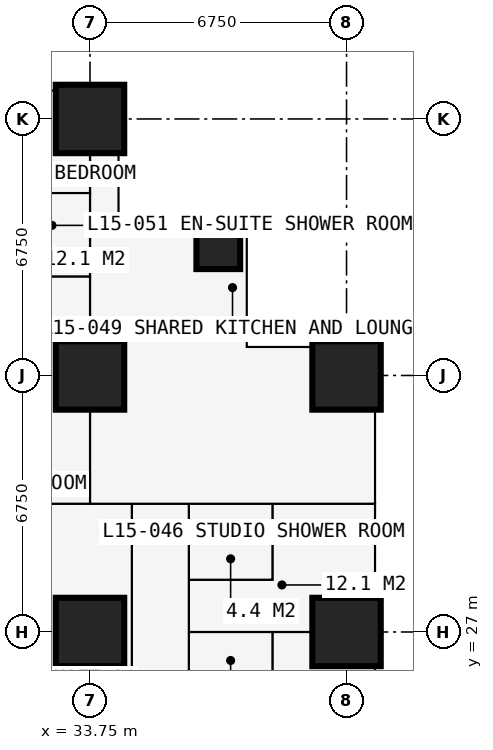
"""IFC4 building model, lengths in metres.
Left out: names, types, materials, properties, quantities, classifications, styles, units other than length and angle.
Written with IfcOpenShell. Run it as: python <this file> out.ifc"""

import sys

from ifc_helpers import new_model, si_unit, direction, frame, frame_2d, origin, origin_2d, place, context, subcontext, project, spatial, rectangle, extrude, element, fill, save


model = new_model("IFC4")
c1 = context("Model", 3, precision=1e-05, world=origin(), true_north=direction((0.0, 1.0)))
c2 = subcontext(c1, "Body", "Model", "MODEL_VIEW")
j1 = project(units=[si_unit("LENGTHUNIT", "METRE"), si_unit("PLANEANGLEUNIT", "RADIAN")], contexts=[c1])
p1 = place(None, origin())
s1 = spatial("IfcSite", under=j1, at=p1, CompositionType="ELEMENT")
p2 = place(p1, origin())
s2 = spatial("IfcBuilding", under=s1, at=p2, CompositionType="ELEMENT")
p3 = place(p2, frame((0.0, 0.0, 57.6)))
s3 = spatial("IfcBuildingStorey", under=s2, at=p3, CompositionType="ELEMENT", Elevation=57.6)
for number, where, z_axis, x_axis in (
    (1, (33.75, 27.0, 0.0), (0.0, 0.0, 1.0), (1.0, 0.0, 0.0)),
    (2, (33.75, 33.75, 0.0), (0.0, 0.0, 1.0), (1.0, 0.0, 0.0)),
    (3, (33.75, 40.5, 0.0), (0.0, 0.0, 1.0), (1.0, 0.0, 0.0)),
):
    element("IfcColumn", number, at=place(p3, frame(where, z_axis=z_axis, x_axis=x_axis)), inside=s3, PredefinedType="COLUMN", context=c2, shape_type="SweptSolid", body=[
        extrude(rectangle(XDim=1.8, YDim=1.8, at=origin_2d()), origin(), (0.0, 0.0, 1.0), 3.6),
    ])
p4 = place(p3, frame((37.125, 37.125, 0.0), z_axis=(0.0, 0.0, 1.0), x_axis=(1.0, 0.0, 0.0)))
e4 = element("IfcColumn", 4, at=p4, inside=s3, PredefinedType="COLUMN", context=c2, shape_type="SweptSolid", body=[
    extrude(rectangle(XDim=1.15, YDim=1.15, at=origin_2d()), origin(), (0.0, 0.0, 1.0), 3.6),
])
for number, where, z_axis, x_axis in (
    (5, (40.5, 27.0, 0.0), (0.0, 0.0, 1.0), (1.0, 0.0, 0.0)),
    (6, (40.5, 33.75, 0.0), (0.0, 0.0, 1.0), (1.0, 0.0, 0.0)),
):
    element("IfcColumn", number, at=place(p3, frame(where, z_axis=z_axis, x_axis=x_axis)), inside=s3, PredefinedType="COLUMN", context=c2, shape_type="SweptSolid", body=[
        extrude(rectangle(XDim=1.8, YDim=1.8, at=origin_2d()), origin(), (0.0, 0.0, 1.0), 3.6),
    ])
p5 = place(p3, frame((41.25, 27.0, 0.0), z_axis=(0.0, 0.0, 1.0), x_axis=(0.0, -1.0, 0.0)))
e7 = element("IfcWall", 7, at=p5, inside=s3, PredefinedType="SOLIDWALL", context=c2, shape_type="SweptSolid", body=[
    extrude(rectangle(XDim=6.75, YDim=0.15, at=frame_2d((3.375, 0.0))), origin(), (0.0, 0.0, 1.0), 3.375),
])
p6 = place(p5, frame((0.962, 0.0, 0.0)))
e8 = element("IfcOpeningElement", 8, at=p6, cuts=e7, PredefinedType="OPENING", context=c2, shape_type="SweptSolid", body=[
    extrude(rectangle(XDim=1.0, YDim=2.2, at=frame_2d((0.5, 1.1))), frame((0.0, 0.085, 0.0), z_axis=(0.0, -1.0, 0.0), x_axis=(1.0, 0.0, 0.0)), (0.0, 0.0, 1.0), 0.17),
])
p7 = place(p5, frame((2.025, 0.0, 0.9)))
e9 = element("IfcOpeningElement", 9, at=p7, cuts=e7, PredefinedType="OPENING", context=c2, shape_type="SweptSolid", body=[
    extrude(rectangle(XDim=1.2, YDim=1.8, at=frame_2d((0.6, 0.9))), frame((0.0, 0.085, 0.0), z_axis=(0.0, -1.0, 0.0), x_axis=(1.0, 0.0, 0.0)), (0.0, 0.0, 1.0), 0.17),
])
p8 = place(p5, frame((4.788, 0.0, 0.0)))
e10 = element("IfcOpeningElement", 10, at=p8, cuts=e7, PredefinedType="OPENING", context=c2, shape_type="SweptSolid", body=[
    extrude(rectangle(XDim=1.0, YDim=2.2, at=frame_2d((0.5, 1.1))), frame((0.0, 0.085, 0.0), z_axis=(0.0, -1.0, 0.0), x_axis=(1.0, 0.0, 0.0)), (0.0, 0.0, 1.0), 0.17),
])
p9 = place(p5, frame((3.525, 0.0, 0.9)))
e11 = element("IfcOpeningElement", 11, at=p9, cuts=e7, PredefinedType="OPENING", context=c2, shape_type="SweptSolid", body=[
    extrude(rectangle(XDim=1.2, YDim=1.8, at=frame_2d((0.6, 0.9))), frame((0.0, 0.085, 0.0), z_axis=(0.0, -1.0, 0.0), x_axis=(1.0, 0.0, 0.0)), (0.0, 0.0, 1.0), 0.17),
])
p10 = place(p3, frame((41.25, 34.5, 0.0), z_axis=(0.0, 0.0, 1.0), x_axis=(-1.0, 0.0, 0.0)))
e12 = element("IfcWall", 12, at=p10, inside=s3, PredefinedType="SOLIDWALL", context=c2, shape_type="SweptSolid", body=[
    extrude(rectangle(XDim=3.375, YDim=0.3, at=frame_2d((1.688, 0.0))), origin(), (0.0, 0.0, 1.0), 3.375),
])
p11 = place(p10, frame((1.833, 0.0, 0.9)))
e13 = element("IfcOpeningElement", 13, at=p11, cuts=e12, PredefinedType="OPENING", context=c2, shape_type="SweptSolid", body=[
    extrude(rectangle(XDim=1.2, YDim=1.8, at=frame_2d((0.6, 0.9))), frame((0.0, 0.16, 0.0), z_axis=(0.0, -1.0, 0.0), x_axis=(1.0, 0.0, 0.0)), (0.0, 0.0, 1.0), 0.32),
])
p12 = place(p3, frame((37.875, 34.5, 0.0), z_axis=(0.0, 0.0, 1.0), x_axis=(0.0, 1.0, 0.0)))
e14 = element("IfcWall", 14, at=p12, inside=s3, PredefinedType="SOLIDWALL", context=c2, shape_type="SweptSolid", body=[
    extrude(rectangle(XDim=3.375, YDim=0.3, at=frame_2d((1.688, 0.0))), origin(), (0.0, 0.0, 1.0), 3.375),
])
p13 = place(p12, frame((0.788, 0.0, 0.6)))
e15 = element("IfcOpeningElement", 15, at=p13, cuts=e14, PredefinedType="OPENING", context=c2, shape_type="SweptSolid", body=[
    extrude(rectangle(XDim=1.8, YDim=2.1, at=frame_2d((0.9, 1.05))), frame((0.0, 0.16, 0.0), z_axis=(0.0, -1.0, 0.0), x_axis=(1.0, 0.0, 0.0)), (0.0, 0.0, 1.0), 0.32),
])
p14 = place(p3, frame((37.875, 37.875, 0.0), z_axis=(0.0, 0.0, 1.0), x_axis=(-1.0, 0.0, 0.0)))
e16 = element("IfcWall", 16, at=p14, inside=s3, PredefinedType="SOLIDWALL", context=c2, shape_type="SweptSolid", body=[
    extrude(rectangle(XDim=3.375, YDim=0.3, at=frame_2d((1.688, 0.0))), origin(), (0.0, 0.0, 1.0), 3.375),
])
p15 = place(p14, frame((0.788, 0.0, 0.6)))
e17 = element("IfcOpeningElement", 17, at=p15, cuts=e16, PredefinedType="OPENING", context=c2, shape_type="SweptSolid", body=[
    extrude(rectangle(XDim=1.8, YDim=2.1, at=frame_2d((0.9, 1.05))), frame((0.0, 0.16, 0.0), z_axis=(0.0, -1.0, 0.0), x_axis=(1.0, 0.0, 0.0)), (0.0, 0.0, 1.0), 0.32),
])
p16 = place(p3, frame((34.5, 37.875, 0.0), z_axis=(0.0, 0.0, 1.0), x_axis=(0.0, 1.0, 0.0)))
e18 = element("IfcWall", 18, at=p16, inside=s3, PredefinedType="SOLIDWALL", context=c2, shape_type="SweptSolid", body=[
    extrude(rectangle(XDim=3.375, YDim=0.3, at=frame_2d((1.688, 0.0))), origin(), (0.0, 0.0, 1.0), 3.375),
])
p17 = place(p16, frame((0.343, 0.0, 0.9)))
e19 = element("IfcOpeningElement", 19, at=p17, cuts=e18, PredefinedType="OPENING", context=c2, shape_type="SweptSolid", body=[
    extrude(rectangle(XDim=1.2, YDim=1.8, at=frame_2d((0.6, 0.9))), frame((0.0, 0.16, 0.0), z_axis=(0.0, -1.0, 0.0), x_axis=(1.0, 0.0, 0.0)), (0.0, 0.0, 1.0), 0.32),
])
p18 = place(p3, frame((10.125, 36.35, 0.0), z_axis=(0.0, 0.0, 1.0), x_axis=(1.0, 0.0, 0.0)))
e20 = element("IfcWall", 20, at=p18, inside=s3, PredefinedType="PARTITIONING", context=c2, shape_type="SweptSolid", body=[
    extrude(rectangle(XDim=23.625, YDim=0.1, at=frame_2d((11.812, 0.0))), origin(), (0.0, 0.0, 1.0), 3.375),
])
p19 = place(p18, frame((20.5, 0.0, 0.0)))
e21 = element("IfcOpeningElement", 21, at=p19, cuts=e20, PredefinedType="OPENING", context=c2, shape_type="SweptSolid", body=[
    extrude(rectangle(XDim=0.95, YDim=2.2, at=frame_2d((0.475, 1.1))), frame((0.0, 0.06, 0.0), z_axis=(0.0, -1.0, 0.0), x_axis=(1.0, 0.0, 0.0)), (0.0, 0.0, 1.0), 0.12),
])
p20 = place(p18, frame((17.125, 0.0, 0.0)))
e22 = element("IfcOpeningElement", 22, at=p20, cuts=e20, PredefinedType="OPENING", context=c2, shape_type="SweptSolid", body=[
    extrude(rectangle(XDim=0.95, YDim=2.2, at=frame_2d((0.475, 1.1))), frame((0.0, 0.06, 0.0), z_axis=(0.0, -1.0, 0.0), x_axis=(1.0, 0.0, 0.0)), (0.0, 0.0, 1.0), 0.12),
])
p21 = place(p18, frame((13.7, 0.0, 0.0)))
e23 = element("IfcOpeningElement", 23, at=p21, cuts=e20, PredefinedType="OPENING", context=c2, shape_type="SweptSolid", body=[
    extrude(rectangle(XDim=0.95, YDim=2.2, at=frame_2d((0.475, 1.1))), frame((0.0, 0.06, 0.0), z_axis=(0.0, -1.0, 0.0), x_axis=(1.0, 0.0, 0.0)), (0.0, 0.0, 1.0), 0.12),
])
p22 = place(p18, frame((0.2, 0.0, 0.0)))
e24 = element("IfcOpeningElement", 24, at=p22, cuts=e20, PredefinedType="OPENING", context=c2, shape_type="SweptSolid", body=[
    extrude(rectangle(XDim=0.95, YDim=2.2, at=frame_2d((0.475, 1.1))), frame((0.0, 0.06, 0.0), z_axis=(0.0, -1.0, 0.0), x_axis=(1.0, 0.0, 0.0)), (0.0, 0.0, 1.0), 0.12),
])
p23 = place(p18, frame((3.625, 0.0, 0.0)))
e25 = element("IfcOpeningElement", 25, at=p23, cuts=e20, PredefinedType="OPENING", context=c2, shape_type="SweptSolid", body=[
    extrude(rectangle(XDim=0.95, YDim=2.2, at=frame_2d((0.475, 1.1))), frame((0.0, 0.06, 0.0), z_axis=(0.0, -1.0, 0.0), x_axis=(1.0, 0.0, 0.0)), (0.0, 0.0, 1.0), 0.12),
])
p24 = place(p18, frame((7.0, 0.0, 0.0)))
e26 = element("IfcOpeningElement", 26, at=p24, cuts=e20, PredefinedType="OPENING", context=c2, shape_type="SweptSolid", body=[
    extrude(rectangle(XDim=0.95, YDim=2.2, at=frame_2d((0.475, 1.1))), frame((0.0, 0.06, 0.0), z_axis=(0.0, -1.0, 0.0), x_axis=(1.0, 0.0, 0.0)), (0.0, 0.0, 1.0), 0.12),
])
p25 = place(p18, frame((10.375, 0.0, 0.0)))
e27 = element("IfcOpeningElement", 27, at=p25, cuts=e20, PredefinedType="OPENING", context=c2, shape_type="SweptSolid", body=[
    extrude(rectangle(XDim=0.95, YDim=2.2, at=frame_2d((0.475, 1.1))), frame((0.0, 0.06, 0.0), z_axis=(0.0, -1.0, 0.0), x_axis=(1.0, 0.0, 0.0)), (0.0, 0.0, 1.0), 0.12),
])
p26 = place(p3, frame((30.375, 30.375, 0.0), z_axis=(0.0, 0.0, 1.0), x_axis=(1.0, 0.0, 0.0)))
e28 = element("IfcWall", 28, at=p26, inside=s3, PredefinedType="PARTITIONING", context=c2, shape_type="SweptSolid", body=[
    extrude(rectangle(XDim=10.859, YDim=0.15, at=frame_2d((5.429, 0.0))), origin(), (0.0, 0.0, 1.0), 3.375),
])
p27 = place(p3, frame((31.75, 38.55, 0.0), z_axis=(0.0, 0.0, 1.0), x_axis=(1.0, 0.0, 0.0)))
e29 = element("IfcWall", 29, at=p27, inside=s3, PredefinedType="PARTITIONING", context=c2, shape_type="SweptSolid", body=[
    extrude(rectangle(XDim=2.0, YDim=0.1, at=frame_2d((1.0, 0.0))), origin(), (0.0, 0.0, 1.0), 3.375),
])
p28 = place(p3, frame((33.75, 30.375, 0.0), z_axis=(0.0, 0.0, 1.0), x_axis=(0.0, 1.0, 0.0)))
e30 = element("IfcWall", 30, at=p28, inside=s3, PredefinedType="PARTITIONING", context=c2, shape_type="SweptSolid", body=[
    extrude(rectangle(XDim=10.859, YDim=0.15, at=frame_2d((5.429, 0.0))), origin(), (0.0, 0.0, 1.0), 2.877),
])
p29 = place(p28, frame((1.45, 0.0, 0.0)))
e31 = element("IfcOpeningElement", 31, at=p29, cuts=e30, PredefinedType="OPENING", context=c2, shape_type="SweptSolid", body=[
    extrude(rectangle(XDim=1.0, YDim=2.2, at=frame_2d((0.5, 1.1))), frame((0.0, 0.085, 0.0), z_axis=(0.0, -1.0, 0.0), x_axis=(1.0, 0.0, 0.0)), (0.0, 0.0, 1.0), 0.17),
])
p30 = place(p3, frame((34.85, 12.55, 0.0), z_axis=(0.0, 0.0, 1.0), x_axis=(0.0, 1.0, 0.0)))
e32 = element("IfcWall", 32, at=p30, inside=s3, PredefinedType="PARTITIONING", context=c2, shape_type="SweptSolid", body=[
    extrude(rectangle(XDim=17.825, YDim=0.15, at=frame_2d((8.913, 0.0))), origin(), (0.0, 0.0, 1.0), 3.375),
])
p31 = place(p30, frame((8.6, 0.0, 0.0)))
e33 = element("IfcOpeningElement", 33, at=p31, cuts=e32, PredefinedType="OPENING", context=c2, shape_type="SweptSolid", body=[
    extrude(rectangle(XDim=0.95, YDim=2.2, at=frame_2d((0.475, 1.1))), frame((0.0, 0.085, 0.0), z_axis=(0.0, -1.0, 0.0), x_axis=(1.0, 0.0, 0.0)), (0.0, 0.0, 1.0), 0.17),
])
p32 = place(p3, frame((36.35, 6.75, 0.0), z_axis=(0.0, 0.0, 1.0), x_axis=(0.0, 1.0, 0.0)))
e34 = element("IfcWall", 34, at=p32, inside=s3, PredefinedType="PARTITIONING", context=c2, shape_type="SweptSolid", body=[
    extrude(rectangle(XDim=23.625, YDim=0.1, at=frame_2d((11.812, 0.0))), origin(), (0.0, 0.0, 1.0), 3.375),
])
p33 = place(p32, frame((0.2, 0.0, 0.0)))
e35 = element("IfcOpeningElement", 35, at=p33, cuts=e34, PredefinedType="OPENING", context=c2, shape_type="SweptSolid", body=[
    extrude(rectangle(XDim=0.95, YDim=2.2, at=frame_2d((0.475, 1.1))), frame((0.0, 0.06, 0.0), z_axis=(0.0, -1.0, 0.0), x_axis=(1.0, 0.0, 0.0)), (0.0, 0.0, 1.0), 0.12),
])
p34 = place(p32, frame((3.575, 0.0, 0.0)))
e36 = element("IfcOpeningElement", 36, at=p34, cuts=e34, PredefinedType="OPENING", context=c2, shape_type="SweptSolid", body=[
    extrude(rectangle(XDim=0.95, YDim=2.2, at=frame_2d((0.475, 1.1))), frame((0.0, 0.06, 0.0), z_axis=(0.0, -1.0, 0.0), x_axis=(1.0, 0.0, 0.0)), (0.0, 0.0, 1.0), 0.12),
])
p35 = place(p32, frame((7.0, 0.0, 0.0)))
e37 = element("IfcOpeningElement", 37, at=p35, cuts=e34, PredefinedType="OPENING", context=c2, shape_type="SweptSolid", body=[
    extrude(rectangle(XDim=0.95, YDim=2.2, at=frame_2d((0.475, 1.1))), frame((0.0, 0.06, 0.0), z_axis=(0.0, -1.0, 0.0), x_axis=(1.0, 0.0, 0.0)), (0.0, 0.0, 1.0), 0.12),
])
p36 = place(p32, frame((10.375, 0.0, 0.0)))
e38 = element("IfcOpeningElement", 38, at=p36, cuts=e34, PredefinedType="OPENING", context=c2, shape_type="SweptSolid", body=[
    extrude(rectangle(XDim=0.95, YDim=2.2, at=frame_2d((0.475, 1.1))), frame((0.0, 0.06, 0.0), z_axis=(0.0, -1.0, 0.0), x_axis=(1.0, 0.0, 0.0)), (0.0, 0.0, 1.0), 0.12),
])
p37 = place(p32, frame((13.75, 0.0, 0.0)))
e39 = element("IfcOpeningElement", 39, at=p37, cuts=e34, PredefinedType="OPENING", context=c2, shape_type="SweptSolid", body=[
    extrude(rectangle(XDim=0.95, YDim=2.2, at=frame_2d((0.475, 1.1))), frame((0.0, 0.06, 0.0), z_axis=(0.0, -1.0, 0.0), x_axis=(1.0, 0.0, 0.0)), (0.0, 0.0, 1.0), 0.12),
])
p38 = place(p32, frame((17.125, 0.0, 0.0)))
e40 = element("IfcOpeningElement", 40, at=p38, cuts=e34, PredefinedType="OPENING", context=c2, shape_type="SweptSolid", body=[
    extrude(rectangle(XDim=0.95, YDim=2.2, at=frame_2d((0.475, 1.1))), frame((0.0, 0.06, 0.0), z_axis=(0.0, -1.0, 0.0), x_axis=(1.0, 0.0, 0.0)), (0.0, 0.0, 1.0), 0.12),
])
p39 = place(p32, frame((20.5, 0.0, 0.0)))
e41 = element("IfcOpeningElement", 41, at=p39, cuts=e34, PredefinedType="OPENING", context=c2, shape_type="SweptSolid", body=[
    extrude(rectangle(XDim=0.95, YDim=2.2, at=frame_2d((0.475, 1.1))), frame((0.0, 0.06, 0.0), z_axis=(0.0, -1.0, 0.0), x_axis=(1.0, 0.0, 0.0)), (0.0, 0.0, 1.0), 0.12),
])
p40 = place(p3, frame((36.35, 27.0, 0.0), z_axis=(0.0, 0.0, 1.0), x_axis=(1.0, 0.0, 0.0)))
e42 = element("IfcWall", 42, at=p40, inside=s3, PredefinedType="PARTITIONING", context=c2, shape_type="SweptSolid", body=[
    extrude(rectangle(XDim=4.884, YDim=0.175, at=frame_2d((2.442, 0.0))), origin(), (0.0, 0.0, 1.0), 2.877),
])
p41 = place(p3, frame((36.35, 28.375, 0.0), z_axis=(0.0, 0.0, 1.0), x_axis=(1.0, 0.0, 0.0)))
e43 = element("IfcWall", 43, at=p41, inside=s3, PredefinedType="PARTITIONING", context=c2, shape_type="SweptSolid", body=[
    extrude(rectangle(XDim=2.2, YDim=0.1, at=frame_2d((1.1, 0.0))), origin(), (0.0, 0.0, 1.0), 3.375),
])
p42 = place(p41, frame((0.65, 0.0, 0.0)))
e44 = element("IfcOpeningElement", 44, at=p42, cuts=e43, PredefinedType="OPENING", context=c2, shape_type="SweptSolid", body=[
    extrude(rectangle(XDim=0.9, YDim=2.2, at=frame_2d((0.45, 1.1))), frame((0.0, 0.06, 0.0), z_axis=(0.0, -1.0, 0.0), x_axis=(1.0, 0.0, 0.0)), (0.0, 0.0, 1.0), 0.12),
])
for number, where, z_axis, x_axis in (
    (45, (38.55, 25.0, 0.0), (0.0, 0.0, 1.0), (0.0, 1.0, 0.0)),
    (46, (38.55, 28.375, 0.0), (0.0, 0.0, 1.0), (0.0, 1.0, 0.0)),
):
    element("IfcWall", number, at=place(p3, frame(where, z_axis=z_axis, x_axis=x_axis)), inside=s3, PredefinedType="PARTITIONING", context=c2, shape_type="SweptSolid", body=[
        extrude(rectangle(XDim=2.0, YDim=0.1, at=frame_2d((1.0, 0.0))), origin(), (0.0, 0.0, 1.0), 3.375),
    ])
p43 = place(p6, origin())
e47 = element("IfcDoor", 47, at=p43, inside=s3, OperationType="SINGLE_SWING_LEFT", PredefinedType="DOOR", context=c2, shape_type="SweptSolid", body=[
    extrude(rectangle(XDim=1.0, YDim=2.2, at=frame_2d((0.5, 1.1))), frame((0.0, 0.025, 0.0), z_axis=(0.0, -1.0, 0.0), x_axis=(1.0, 0.0, 0.0)), (0.0, 0.0, 1.0), 0.05),
])
fill(e8, e47)
p44 = place(p11, origin())
e48 = element("IfcWindow", 48, at=p44, inside=s3, PartitioningType="SINGLE_PANEL", PredefinedType="WINDOW", context=c2, shape_type="SweptSolid", body=[
    extrude(rectangle(XDim=1.2, YDim=1.8, at=frame_2d((0.6, 0.9))), frame((0.0, 0.03, 0.0), z_axis=(0.0, -1.0, 0.0), x_axis=(1.0, 0.0, 0.0)), (0.0, 0.0, 1.0), 0.06),
])
fill(e13, e48)
p45 = place(p13, origin())
e49 = element("IfcWindow", 49, at=p45, inside=s3, PartitioningType="SINGLE_PANEL", PredefinedType="WINDOW", context=c2, shape_type="SweptSolid", body=[
    extrude(rectangle(XDim=1.8, YDim=2.1, at=frame_2d((0.9, 1.05))), frame((0.0, 0.03, 0.0), z_axis=(0.0, -1.0, 0.0), x_axis=(1.0, 0.0, 0.0)), (0.0, 0.0, 1.0), 0.06),
])
fill(e15, e49)
p46 = place(p15, origin())
e50 = element("IfcWindow", 50, at=p46, inside=s3, PartitioningType="SINGLE_PANEL", PredefinedType="WINDOW", context=c2, shape_type="SweptSolid", body=[
    extrude(rectangle(XDim=1.8, YDim=2.1, at=frame_2d((0.9, 1.05))), frame((0.0, 0.03, 0.0), z_axis=(0.0, -1.0, 0.0), x_axis=(1.0, 0.0, 0.0)), (0.0, 0.0, 1.0), 0.06),
])
fill(e17, e50)
p47 = place(p17, origin())
e51 = element("IfcWindow", 51, at=p47, inside=s3, PartitioningType="SINGLE_PANEL", PredefinedType="WINDOW", context=c2, shape_type="SweptSolid", body=[
    extrude(rectangle(XDim=1.2, YDim=1.8, at=frame_2d((0.6, 0.9))), frame((0.0, 0.03, 0.0), z_axis=(0.0, -1.0, 0.0), x_axis=(1.0, 0.0, 0.0)), (0.0, 0.0, 1.0), 0.06),
])
fill(e19, e51)
p48 = place(p39, origin())
e52 = element("IfcDoor", 52, at=p48, inside=s3, OperationType="SINGLE_SWING_LEFT", PredefinedType="DOOR", context=c2, shape_type="SweptSolid", body=[
    extrude(rectangle(XDim=0.95, YDim=2.2, at=frame_2d((0.475, 1.1))), frame((0.0, 0.025, 0.0), z_axis=(0.0, -1.0, 0.0), x_axis=(1.0, 0.0, 0.0)), (0.0, 0.0, 1.0), 0.05),
])
fill(e41, e52)
p49 = place(p42, origin())
e53 = element("IfcDoor", 53, at=p49, inside=s3, OperationType="SINGLE_SWING_RIGHT", PredefinedType="DOOR", context=c2, shape_type="SweptSolid", body=[
    extrude(rectangle(XDim=0.9, YDim=2.2, at=frame_2d((0.45, 1.1))), frame((0.0, 0.025, 0.0), z_axis=(0.0, -1.0, 0.0), x_axis=(1.0, 0.0, 0.0)), (0.0, 0.0, 1.0), 0.05),
])
fill(e44, e53)
p50 = place(p29, origin())
e54 = element("IfcDoor", 54, at=p50, inside=s3, OperationType="SINGLE_SWING_LEFT", PredefinedType="DOOR", context=c2, shape_type="SweptSolid", body=[
    extrude(rectangle(XDim=1.0, YDim=2.2, at=frame_2d((0.5, 1.1))), frame((0.0, 0.025, 0.0), z_axis=(0.0, -1.0, 0.0), x_axis=(1.0, 0.0, 0.0)), (0.0, 0.0, 1.0), 0.05),
])
fill(e31, e54)
save(model, sys.argv[1])
